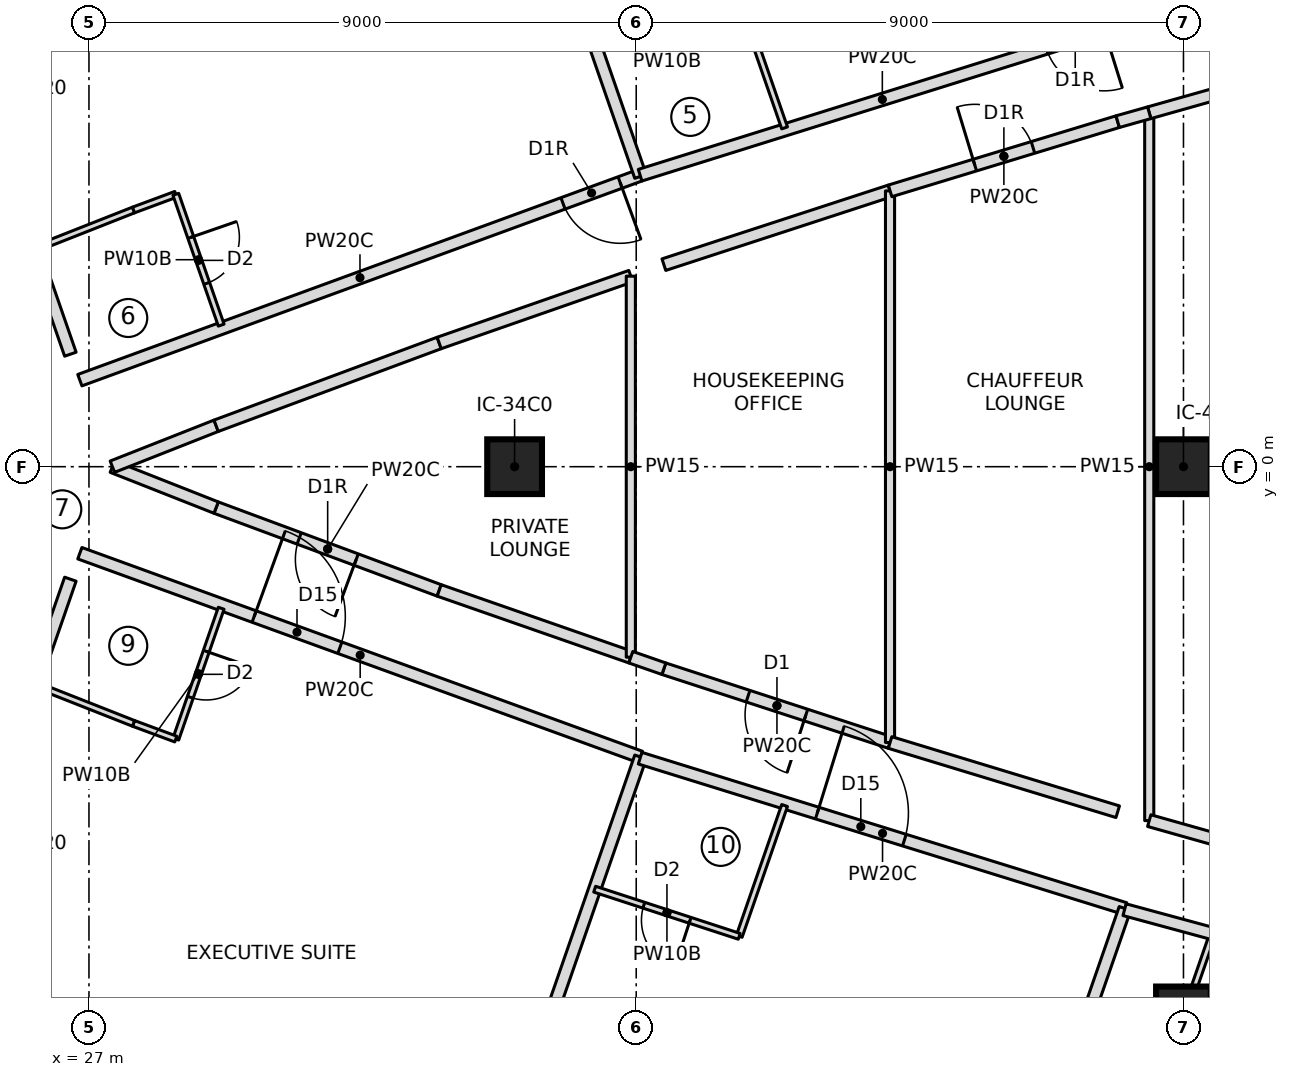
"""IFC4 building model, lengths in metres.
Left out: names, types, materials, properties, quantities, classifications, styles, units other than length and angle.
Written with IfcOpenShell. Run it as: python <this file> out.ifc"""

import sys

from ifc_helpers import new_model, si_unit, direction, frame, frame_2d, origin, origin_2d, place, context, subcontext, project, spatial, rectangle, extrude, element, fill, save


model = new_model("IFC4")
c1 = context("Model", 3, precision=1e-05, world=origin(), true_north=direction((0.0, 1.0)))
c2 = subcontext(c1, "Body", "Model", "MODEL_VIEW")
j1 = project(units=[si_unit("LENGTHUNIT", "METRE"), si_unit("PLANEANGLEUNIT", "RADIAN")], contexts=[c1])
p1 = place(None, origin())
s1 = spatial("IfcSite", under=j1, at=p1, CompositionType="ELEMENT")
p2 = place(p1, origin())
s2 = spatial("IfcBuilding", under=s1, at=p2, CompositionType="ELEMENT")
p3 = place(p2, frame((0.0, 0.0, 292.75)))
s3 = spatial("IfcBuildingStorey", under=s2, at=p3, CompositionType="ELEMENT", Elevation=292.75)
for number, where, z_axis, x_axis in (
    (1, (34.0, 0.0, 0.0), (0.0, 0.0, 1.0), (1.0, 0.0, 0.0)),
    (2, (45.0, -9.0, 0.0), (0.0, 0.0, 1.0), (1.0, 0.0, 0.0)),
    (3, (45.0, 0.0, 0.0), (0.0, 0.0, 1.0), (1.0, 0.0, 0.0)),
):
    element("IfcColumn", number, at=place(p3, frame(where, z_axis=z_axis, x_axis=x_axis)), inside=s3, PredefinedType="COLUMN", context=c2, shape_type="SweptSolid", body=[
        extrude(rectangle(XDim=0.9, YDim=0.9, at=origin_2d()), origin(), (0.0, 0.0, 1.0), 3.55),
    ])
p4 = place(p3, frame((26.694, 1.85, 0.0), z_axis=(0.0, 0.0, 1.0), x_axis=(-0.327714422317, 0.944776829418, 0.0)))
e4 = element("IfcWall", 4, at=p4, inside=s3, PredefinedType="PARTITIONING", context=c2, shape_type="SweptSolid", body=[
    extrude(rectangle(XDim=9.233, YDim=0.2, at=frame_2d((4.617, 0.0))), origin(), (0.0, 0.0, 1.0), 3.25),
])
p5 = place(p3, frame((36.064, 4.794, 0.0), z_axis=(0.0, 0.0, 1.0), x_axis=(-0.93911227702, -0.34361043516, 0.0)))
e5 = element("IfcWall", 5, at=p5, inside=s3, PredefinedType="PARTITIONING", context=c2, shape_type="SweptSolid", body=[
    extrude(rectangle(XDim=9.812, YDim=0.2, at=frame_2d((4.906, 0.0))), origin(), (0.0, 0.0, 1.0), 3.25),
])
p6 = place(p5, frame((0.35, 0.0, 0.0)))
e6 = element("IfcOpeningElement", 6, at=p6, cuts=e5, PredefinedType="OPENING", context=c2, shape_type="SweptSolid", body=[
    extrude(rectangle(XDim=1.0, YDim=2.1, at=frame_2d((0.5, 1.05))), frame((0.0, 0.11, 0.0), z_axis=(0.0, -1.0, 0.0), x_axis=(1.0, 0.0, 0.0)), (0.0, 0.0, 1.0), 0.22),
])
p7 = place(p3, frame((26.096, 3.576, 0.0), z_axis=(0.0, 0.0, 1.0), x_axis=(0.930254925629, 0.366913850028, 0.0)))
e7 = element("IfcWall", 7, at=p7, inside=s3, PredefinedType="PARTITIONING", context=c2, shape_type="SweptSolid", body=[
    extrude(rectangle(XDim=1.76, YDim=0.1, at=frame_2d((0.88, 0.0))), origin(), (0.0, 0.0, 1.0), 3.25),
])
p8 = place(p3, frame((27.733, 4.222, 0.0), z_axis=(0.0, 0.0, 1.0), x_axis=(0.937514267289, 0.347946833049, 0.0)))
e8 = element("IfcWall", 8, at=p8, inside=s3, PredefinedType="PARTITIONING", context=c2, shape_type="SweptSolid", body=[
    extrude(rectangle(XDim=0.742, YDim=0.1, at=frame_2d((0.371, 0.0))), origin(), (0.0, 0.0, 1.0), 3.25),
])
p9 = place(p3, frame((28.428, 4.48, 0.0), z_axis=(0.0, 0.0, 1.0), x_axis=(0.327718024288, -0.944775579996, 0.0)))
e9 = element("IfcWall", 9, at=p9, inside=s3, PredefinedType="PARTITIONING", context=c2, shape_type="SweptSolid", body=[
    extrude(rectangle(XDim=2.277, YDim=0.1, at=frame_2d((1.139, 0.0))), origin(), (0.0, 0.0, 1.0), 3.25),
])
p10 = place(p9, frame((0.75, 0.0, 0.0)))
e10 = element("IfcOpeningElement", 10, at=p10, cuts=e9, PredefinedType="OPENING", context=c2, shape_type="SweptSolid", body=[
    extrude(rectangle(XDim=0.8, YDim=2.1, at=frame_2d((0.4, 1.05))), frame((0.0, 0.06, 0.0), z_axis=(0.0, -1.0, 0.0), x_axis=(1.0, 0.0, 0.0)), (0.0, 0.0, 1.0), 0.12),
])
p11 = place(p3, frame((36.071, 4.775, 0.0), z_axis=(0.0, 0.0, 1.0), x_axis=(-0.327725028322, 0.94477315045, 0.0)))
e11 = element("IfcWall", 11, at=p11, inside=s3, PredefinedType="PARTITIONING", context=c2, shape_type="SweptSolid", body=[
    extrude(rectangle(XDim=9.702, YDim=0.2, at=frame_2d((4.851, 0.0))), origin(), (0.0, 0.0, 1.0), 3.25),
])
p12 = place(p3, frame((44.031, 7.286, 0.0), z_axis=(0.0, 0.0, 1.0), x_axis=(-0.95441177989, -0.29849313963, 0.0)))
e12 = element("IfcWall", 12, at=p12, inside=s3, PredefinedType="PARTITIONING", context=c2, shape_type="SweptSolid", body=[
    extrude(rectangle(XDim=8.348, YDim=0.2, at=frame_2d((4.174, 0.0))), origin(), (0.0, 0.0, 1.0), 3.25),
])
p13 = place(p12, frame((0.35, 0.0, 0.0)))
e13 = element("IfcOpeningElement", 13, at=p13, cuts=e12, PredefinedType="OPENING", context=c2, shape_type="SweptSolid", body=[
    extrude(rectangle(XDim=1.0, YDim=2.1, at=frame_2d((0.5, 1.05))), frame((0.0, 0.11, 0.0), z_axis=(0.0, -1.0, 0.0), x_axis=(1.0, 0.0, 0.0)), (0.0, 0.0, 1.0), 0.22),
])
p14 = place(p3, frame((37.694, 7.724, 0.0), z_axis=(0.0, 0.0, 1.0), x_axis=(0.327622330203, -0.944808768351, 0.0)))
e14 = element("IfcWall", 14, at=p14, inside=s3, PredefinedType="PARTITIONING", context=c2, shape_type="SweptSolid", body=[
    extrude(rectangle(XDim=2.277, YDim=0.1, at=frame_2d((1.139, 0.0))), origin(), (0.0, 0.0, 1.0), 3.25),
])
p15 = place(p3, frame((23.668, -10.573, 0.0), z_axis=(0.0, 0.0, 1.0), x_axis=(0.327714422317, 0.944776829418, 0.0)))
e15 = element("IfcWall", 15, at=p15, inside=s3, PredefinedType="PARTITIONING", context=c2, shape_type="SweptSolid", body=[
    extrude(rectangle(XDim=9.233, YDim=0.2, at=frame_2d((4.617, 0.0))), origin(), (0.0, 0.0, 1.0), 3.25),
])
p16 = place(p3, frame((26.85, -1.423, 0.0), z_axis=(0.0, 0.0, 1.0), x_axis=(0.939807953272, -0.341703103536, 0.0)))
e16 = element("IfcWall", 16, at=p16, inside=s3, PredefinedType="PARTITIONING", context=c2, shape_type="SweptSolid", body=[
    extrude(rectangle(XDim=9.811, YDim=0.2, at=frame_2d((4.906, 0.0))), origin(), (0.0, 0.0, 1.0), 3.25),
])
p17 = place(p16, frame((3.05, 0.0, 0.0)))
e17 = element("IfcOpeningElement", 17, at=p17, cuts=e16, PredefinedType="OPENING", context=c2, shape_type="SweptSolid", body=[
    extrude(rectangle(XDim=1.5, YDim=2.1, at=frame_2d((0.75, 1.05))), frame((0.0, 0.11, 0.0), z_axis=(0.0, -1.0, 0.0), x_axis=(1.0, 0.0, 0.0)), (0.0, 0.0, 1.0), 0.22),
])
p18 = place(p3, frame((29.175, -2.328, 0.0), z_axis=(0.0, 0.0, 1.0), x_axis=(-0.327718024288, -0.944775579996, 0.0)))
e18 = element("IfcWall", 18, at=p18, inside=s3, PredefinedType="PARTITIONING", context=c2, shape_type="SweptSolid", body=[
    extrude(rectangle(XDim=2.277, YDim=0.1, at=frame_2d((1.139, 0.0))), origin(), (0.0, 0.0, 1.0), 3.25),
])
p19 = place(p18, frame((0.75, 0.0, 0.0)))
e19 = element("IfcOpeningElement", 19, at=p19, cuts=e18, PredefinedType="OPENING", context=c2, shape_type="SweptSolid", body=[
    extrude(rectangle(XDim=0.8, YDim=2.1, at=frame_2d((0.4, 1.05))), frame((0.0, 0.06, 0.0), z_axis=(0.0, -1.0, 0.0), x_axis=(1.0, 0.0, 0.0)), (0.0, 0.0, 1.0), 0.12),
])
p20 = place(p3, frame((28.428, -4.48, 0.0), z_axis=(0.0, 0.0, 1.0), x_axis=(-0.937514267289, 0.347946833049, 0.0)))
e20 = element("IfcWall", 20, at=p20, inside=s3, PredefinedType="PARTITIONING", context=c2, shape_type="SweptSolid", body=[
    extrude(rectangle(XDim=0.742, YDim=0.1, at=frame_2d((0.371, 0.0))), origin(), (0.0, 0.0, 1.0), 3.25),
])
p21 = place(p3, frame((27.733, -4.222, 0.0), z_axis=(0.0, 0.0, 1.0), x_axis=(-0.930254925629, 0.366913850028, 0.0)))
e21 = element("IfcWall", 21, at=p21, inside=s3, PredefinedType="PARTITIONING", context=c2, shape_type="SweptSolid", body=[
    extrude(rectangle(XDim=1.76, YDim=0.1, at=frame_2d((0.88, 0.0))), origin(), (0.0, 0.0, 1.0), 3.25),
])
p22 = place(p3, frame((32.891, -13.941, 0.0), z_axis=(0.0, 0.0, 1.0), x_axis=(0.327725028322, 0.94477315045, 0.0)))
e22 = element("IfcWall", 22, at=p22, inside=s3, PredefinedType="PARTITIONING", context=c2, shape_type="SweptSolid", body=[
    extrude(rectangle(XDim=9.702, YDim=0.2, at=frame_2d((4.851, 0.0))), origin(), (0.0, 0.0, 1.0), 3.25),
])
p23 = place(p3, frame((36.064, -4.794, 0.0), z_axis=(0.0, 0.0, 1.0), x_axis=(0.955129200503, -0.296189483855, 0.0)))
e23 = element("IfcWall", 23, at=p23, inside=s3, PredefinedType="PARTITIONING", context=c2, shape_type="SweptSolid", body=[
    extrude(rectangle(XDim=8.348, YDim=0.2, at=frame_2d((4.174, 0.0))), origin(), (0.0, 0.0, 1.0), 3.25),
])
p24 = place(p23, frame((3.05, 0.0, 0.0)))
e24 = element("IfcOpeningElement", 24, at=p24, cuts=e23, PredefinedType="OPENING", context=c2, shape_type="SweptSolid", body=[
    extrude(rectangle(XDim=1.5, YDim=2.1, at=frame_2d((0.75, 1.05))), frame((0.0, 0.11, 0.0), z_axis=(0.0, -1.0, 0.0), x_axis=(1.0, 0.0, 0.0)), (0.0, 0.0, 1.0), 0.22),
])
p25 = place(p3, frame((38.44, -5.573, 0.0), z_axis=(0.0, 0.0, 1.0), x_axis=(-0.327622330203, -0.944808768351, 0.0)))
e25 = element("IfcWall", 25, at=p25, inside=s3, PredefinedType="PARTITIONING", context=c2, shape_type="SweptSolid", body=[
    extrude(rectangle(XDim=2.277, YDim=0.1, at=frame_2d((1.139, 0.0))), origin(), (0.0, 0.0, 1.0), 3.25),
])
p26 = place(p3, frame((37.694, -7.724, 0.0), z_axis=(0.0, 0.0, 1.0), x_axis=(-0.950666002187, 0.310216299194, 0.0)))
e26 = element("IfcWall", 26, at=p26, inside=s3, PredefinedType="PARTITIONING", context=c2, shape_type="SweptSolid", body=[
    extrude(rectangle(XDim=2.5, YDim=0.1, at=frame_2d((1.25, 0.0))), origin(), (0.0, 0.0, 1.0), 3.25),
])
p27 = place(p26, frame((0.85, 0.0, 0.0)))
e27 = element("IfcOpeningElement", 27, at=p27, cuts=e26, PredefinedType="OPENING", context=c2, shape_type="SweptSolid", body=[
    extrude(rectangle(XDim=0.8, YDim=2.1, at=frame_2d((0.4, 1.05))), frame((0.0, 0.06, 0.0), z_axis=(0.0, -1.0, 0.0), x_axis=(1.0, 0.0, 0.0)), (0.0, 0.0, 1.0), 0.12),
])
p28 = place(p3, frame((40.854, -16.447, 0.0), z_axis=(0.0, 0.0, 1.0), x_axis=(0.327714576096, 0.944776776077, 0.0)))
e28 = element("IfcWall", 28, at=p28, inside=s3, PredefinedType="PARTITIONING", context=c2, shape_type="SweptSolid", body=[
    extrude(rectangle(XDim=9.717, YDim=0.2, at=frame_2d((4.858, 0.0))), origin(), (0.0, 0.0, 1.0), 3.25),
])
p29 = place(p3, frame((45.45, -9.448, 0.0), z_axis=(0.0, 0.0, 1.0), x_axis=(0.0, 1.0, 0.0)))
e29 = element("IfcWall", 29, at=p29, inside=s3, PredefinedType="PARTITIONING", context=c2, shape_type="SweptSolid", body=[
    extrude(rectangle(XDim=0.896, YDim=0.1, at=frame_2d((0.448, 0.0))), origin(), (0.0, 0.0, 1.0), 3.25),
])
p30 = place(p3, frame((45.18, -8.55, 0.0), z_axis=(0.0, 0.0, 1.0), x_axis=(0.327723446833, 0.944773699039, 0.0)))
e30 = element("IfcWall", 30, at=p30, inside=s3, PredefinedType="PARTITIONING", context=c2, shape_type="SweptSolid", body=[
    extrude(rectangle(XDim=0.903, YDim=0.1, at=frame_2d((0.451, 0.0))), origin(), (0.0, 0.0, 1.0), 3.25),
])
p31 = place(p3, frame((32.76, -2.035, 0.0), z_axis=(0.0, 0.0, 1.0), x_axis=(-0.937460178932, 0.348092534992, 0.0)))
e31 = element("IfcWall", 31, at=p31, inside=s3, PredefinedType="PARTITIONING", context=c2, shape_type="SweptSolid", body=[
    extrude(rectangle(XDim=3.913, YDim=0.2, at=frame_2d((1.957, 0.0))), origin(), (0.0, 0.0, 1.0), 3.25),
])
p32 = place(p31, frame((1.457, 0.0, 0.0)))
e32 = element("IfcOpeningElement", 32, at=p32, cuts=e31, PredefinedType="OPENING", context=c2, shape_type="SweptSolid", body=[
    extrude(rectangle(XDim=1.0, YDim=2.1, at=frame_2d((0.5, 1.05))), frame((0.0, 0.11, 0.0), z_axis=(0.0, -1.0, 0.0), x_axis=(1.0, 0.0, 0.0)), (0.0, 0.0, 1.0), 0.22),
])
for number, where, z_axis, x_axis in (
    (33, (29.092, -0.673, 0.0), (0.0, 0.0, 1.0), (-0.93, 0.367, 0.0)),
    (34, (27.385, 0.0, 0.0), (0.0, 0.0, 1.0), (0.93, 0.367, 0.0)),
):
    element("IfcWall", number, at=place(p3, frame(where, z_axis=z_axis, x_axis=x_axis)), inside=s3, PredefinedType="PARTITIONING", context=c2, shape_type="SweptSolid", body=[
        extrude(rectangle(XDim=1.834, YDim=0.2, at=frame_2d((0.917, 0.0))), origin(), (0.0, 0.0, 1.0), 3.25),
    ])
p33 = place(p3, frame((29.092, 0.673, 0.0), z_axis=(0.0, 0.0, 1.0), x_axis=(0.937460178932, 0.348092534992, 0.0)))
e35 = element("IfcWall", 35, at=p33, inside=s3, PredefinedType="PARTITIONING", context=c2, shape_type="SweptSolid", body=[
    extrude(rectangle(XDim=3.913, YDim=0.2, at=frame_2d((1.957, 0.0))), origin(), (0.0, 0.0, 1.0), 3.25),
])
for number, where, z_axis, x_axis in (
    (36, (32.76, 2.035, 0.0), (0.0, 0.0, 1.0), (0.944, 0.329, 0.0)),
    (37, (35.911, -3.133, 0.0), (0.0, 0.0, 1.0), (-0.944, 0.329, 0.0)),
):
    element("IfcWall", number, at=place(p3, frame(where, z_axis=z_axis, x_axis=x_axis)), inside=s3, PredefinedType="PARTITIONING", context=c2, shape_type="SweptSolid", body=[
        extrude(rectangle(XDim=3.338, YDim=0.2, at=frame_2d((1.669, 0.0))), origin(), (0.0, 0.0, 1.0), 3.25),
    ])
p34 = place(p3, frame((35.911, -3.133, 0.0), z_axis=(0.0, 0.0, 1.0), x_axis=(0.0, 1.0, 0.0)))
e38 = element("IfcWall", 38, at=p34, inside=s3, PredefinedType="PARTITIONING", context=c2, shape_type="SweptSolid", body=[
    extrude(rectangle(XDim=6.267, YDim=0.15, at=frame_2d((3.133, 0.0))), origin(), (0.0, 0.0, 1.0), 3.25),
])
p35 = place(p3, frame((40.174, -4.536, 0.0), z_axis=(0.0, 0.0, 1.0), x_axis=(-0.950716244522, 0.310062287938, 0.0)))
e39 = element("IfcWall", 39, at=p35, inside=s3, PredefinedType="PARTITIONING", context=c2, shape_type="SweptSolid", body=[
    extrude(rectangle(XDim=3.913, YDim=0.2, at=frame_2d((1.956, 0.0))), origin(), (0.0, 0.0, 1.0), 3.25),
])
p36 = place(p35, frame((1.456, 0.0, 0.0)))
e40 = element("IfcOpeningElement", 40, at=p36, cuts=e39, PredefinedType="OPENING", context=c2, shape_type="SweptSolid", body=[
    extrude(rectangle(XDim=1.0, YDim=2.1, at=frame_2d((0.5, 1.05))), frame((0.0, 0.11, 0.0), z_axis=(0.0, -1.0, 0.0), x_axis=(1.0, 0.0, 0.0)), (0.0, 0.0, 1.0), 0.22),
])
p37 = place(p3, frame((36.455, 3.323, 0.0), z_axis=(0.0, 0.0, 1.0), x_axis=(0.950716244522, 0.310062287938, 0.0)))
e41 = element("IfcWall", 41, at=p37, inside=s3, PredefinedType="PARTITIONING", context=c2, shape_type="SweptSolid", body=[
    extrude(rectangle(XDim=3.913, YDim=0.2, at=frame_2d((1.956, 0.0))), origin(), (0.0, 0.0, 1.0), 3.25),
])
p38 = place(p3, frame((40.174, -4.536, 0.0), z_axis=(0.0, 0.0, 1.0), x_axis=(0.0, 1.0, 0.0)))
e42 = element("IfcWall", 42, at=p38, inside=s3, PredefinedType="PARTITIONING", context=c2, shape_type="SweptSolid", body=[
    extrude(rectangle(XDim=9.072, YDim=0.15, at=frame_2d((4.536, 0.0))), origin(), (0.0, 0.0, 1.0), 3.25),
])
p39 = place(p3, frame((40.175, 4.536, 0.0), z_axis=(0.0, 0.0, 1.0), x_axis=(0.956723737069, 0.29099775073, 0.0)))
e43 = element("IfcWall", 43, at=p39, inside=s3, PredefinedType="PARTITIONING", context=c2, shape_type="SweptSolid", body=[
    extrude(rectangle(XDim=3.913, YDim=0.2, at=frame_2d((1.957, 0.0))), origin(), (0.0, 0.0, 1.0), 3.25),
])
p40 = place(p39, frame((1.457, 0.0, 0.0)))
e44 = element("IfcOpeningElement", 44, at=p40, cuts=e43, PredefinedType="OPENING", context=c2, shape_type="SweptSolid", body=[
    extrude(rectangle(XDim=1.0, YDim=2.1, at=frame_2d((0.5, 1.05))), frame((0.0, 0.11, 0.0), z_axis=(0.0, -1.0, 0.0), x_axis=(1.0, 0.0, 0.0)), (0.0, 0.0, 1.0), 0.22),
])
p41 = place(p3, frame((43.918, -5.675, 0.0), z_axis=(0.0, 0.0, 1.0), x_axis=(-0.956723737069, 0.29099775073, 0.0)))
e45 = element("IfcWall", 45, at=p41, inside=s3, PredefinedType="PARTITIONING", context=c2, shape_type="SweptSolid", body=[
    extrude(rectangle(XDim=3.913, YDim=0.2, at=frame_2d((1.957, 0.0))), origin(), (0.0, 0.0, 1.0), 3.25),
])
p42 = place(p3, frame((44.437, -5.821, 0.0), z_axis=(0.0, 0.0, 1.0), x_axis=(0.0, 1.0, 0.0)))
e46 = element("IfcWall", 46, at=p42, inside=s3, PredefinedType="PARTITIONING", context=c2, shape_type="SweptSolid", body=[
    extrude(rectangle(XDim=11.642, YDim=0.15, at=frame_2d((5.821, 0.0))), origin(), (0.0, 0.0, 1.0), 3.25),
])
p43 = place(p3, frame((47.684, -6.738, 0.0), z_axis=(0.0, 0.0, 1.0), x_axis=(-0.962403613575, 0.271623424206, 0.0)))
e47 = element("IfcWall", 47, at=p43, inside=s3, PredefinedType="PARTITIONING", context=c2, shape_type="SweptSolid", body=[
    extrude(rectangle(XDim=3.374, YDim=0.2, at=frame_2d((1.687, 0.0))), origin(), (0.0, 0.0, 1.0), 3.25),
])
p44 = place(p43, frame((1.187, 0.0, 0.0)))
e48 = element("IfcOpeningElement", 48, at=p44, cuts=e47, PredefinedType="OPENING", context=c2, shape_type="SweptSolid", body=[
    extrude(rectangle(XDim=1.0, YDim=2.1, at=frame_2d((0.5, 1.05))), frame((0.0, 0.11, 0.0), z_axis=(0.0, -1.0, 0.0), x_axis=(1.0, 0.0, 0.0)), (0.0, 0.0, 1.0), 0.22),
])
p45 = place(p3, frame((44.437, 5.821, 0.0), z_axis=(0.0, 0.0, 1.0), x_axis=(0.962403613575, 0.271623424206, 0.0)))
e49 = element("IfcWall", 49, at=p45, inside=s3, PredefinedType="PARTITIONING", context=c2, shape_type="SweptSolid", body=[
    extrude(rectangle(XDim=3.374, YDim=0.2, at=frame_2d((1.687, 0.0))), origin(), (0.0, 0.0, 1.0), 3.25),
])
p46 = place(p3, frame((44.031, -7.286, 0.0), z_axis=(0.0, 0.0, 1.0), x_axis=(0.965107760304, -0.261853033211, 0.0)))
e50 = element("IfcWall", 50, at=p46, inside=s3, PredefinedType="PARTITIONING", context=c2, shape_type="SweptSolid", body=[
    extrude(rectangle(XDim=4.527, YDim=0.2, at=frame_2d((2.263, 0.0))), origin(), (0.0, 0.0, 1.0), 3.25),
])
p47 = place(p46, frame((1.851, 0.0, 0.0)))
e51 = element("IfcOpeningElement", 51, at=p47, cuts=e50, PredefinedType="OPENING", context=c2, shape_type="SweptSolid", body=[
    extrude(rectangle(XDim=1.5, YDim=2.1, at=frame_2d((0.75, 1.05))), frame((0.0, 0.11, 0.0), z_axis=(0.0, -1.0, 0.0), x_axis=(1.0, 0.0, 0.0)), (0.0, 0.0, 1.0), 0.22),
])
p48 = place(p3, frame((36.455, -3.323, 0.0), z_axis=(0.0, 0.0, 1.0), x_axis=(-0.9442216639, 0.329310566825, 0.0)))
e52 = element("IfcWall", 52, at=p48, inside=s3, PredefinedType="PARTITIONING", context=c2, shape_type="SweptSolid", body=[
    extrude(rectangle(XDim=0.575, YDim=0.2, at=frame_2d((0.288, 0.0))), origin(), (0.0, 0.0, 1.0), 3.25),
])
p49 = place(p3, frame((43.918, 5.675, 0.0), z_axis=(0.0, 0.0, 1.0), x_axis=(0.9624587823, 0.271427876929, 0.0)))
e53 = element("IfcWall", 53, at=p49, inside=s3, PredefinedType="PARTITIONING", context=c2, shape_type="SweptSolid", body=[
    extrude(rectangle(XDim=0.539, YDim=0.2, at=frame_2d((0.27, 0.0))), origin(), (0.0, 0.0, 1.0), 3.25),
])
p50 = place(p10, origin())
e54 = element("IfcDoor", 54, at=p50, inside=s3, OperationType="SINGLE_SWING_LEFT", PredefinedType="DOOR", context=c2, shape_type="SweptSolid", body=[
    extrude(rectangle(XDim=0.8, YDim=2.1, at=frame_2d((0.4, 1.05))), frame((0.0, 0.025, 0.0), z_axis=(0.0, -1.0, 0.0), x_axis=(1.0, 0.0, 0.0)), (0.0, 0.0, 1.0), 0.05),
])
fill(e10, e54)
p51 = place(p6, origin())
e55 = element("IfcDoor", 55, at=p51, inside=s3, OperationType="SINGLE_SWING_RIGHT", PredefinedType="DOOR", context=c2, shape_type="SweptSolid", body=[
    extrude(rectangle(XDim=1.0, YDim=2.1, at=frame_2d((0.5, 1.05))), frame((0.0, 0.025, 0.0), z_axis=(0.0, -1.0, 0.0), x_axis=(1.0, 0.0, 0.0)), (0.0, 0.0, 1.0), 0.05),
])
fill(e6, e55)
p52 = place(p19, origin())
e56 = element("IfcDoor", 56, at=p52, inside=s3, OperationType="SINGLE_SWING_LEFT", PredefinedType="DOOR", context=c2, shape_type="SweptSolid", body=[
    extrude(rectangle(XDim=0.8, YDim=2.1, at=frame_2d((0.4, 1.05))), frame((0.0, 0.025, 0.0), z_axis=(0.0, -1.0, 0.0), x_axis=(1.0, 0.0, 0.0)), (0.0, 0.0, 1.0), 0.05),
])
fill(e19, e56)
p53 = place(p17, origin())
e57 = element("IfcDoor", 57, at=p53, inside=s3, OperationType="DOUBLE_DOOR_SINGLE_SWING", PredefinedType="DOOR", context=c2, shape_type="SweptSolid", body=[
    extrude(rectangle(XDim=1.5, YDim=2.1, at=frame_2d((0.75, 1.05))), frame((0.0, 0.025, 0.0), z_axis=(0.0, -1.0, 0.0), x_axis=(1.0, 0.0, 0.0)), (0.0, 0.0, 1.0), 0.05),
])
fill(e17, e57)
p54 = place(p27, origin())
e58 = element("IfcDoor", 58, at=p54, inside=s3, OperationType="SINGLE_SWING_LEFT", PredefinedType="DOOR", context=c2, shape_type="SweptSolid", body=[
    extrude(rectangle(XDim=0.8, YDim=2.1, at=frame_2d((0.4, 1.05))), frame((0.0, 0.025, 0.0), z_axis=(0.0, -1.0, 0.0), x_axis=(1.0, 0.0, 0.0)), (0.0, 0.0, 1.0), 0.05),
])
fill(e27, e58)
p55 = place(p24, origin())
e59 = element("IfcDoor", 59, at=p55, inside=s3, OperationType="DOUBLE_DOOR_SINGLE_SWING", PredefinedType="DOOR", context=c2, shape_type="SweptSolid", body=[
    extrude(rectangle(XDim=1.5, YDim=2.1, at=frame_2d((0.75, 1.05))), frame((0.0, 0.025, 0.0), z_axis=(0.0, -1.0, 0.0), x_axis=(1.0, 0.0, 0.0)), (0.0, 0.0, 1.0), 0.05),
])
fill(e24, e59)
p56 = place(p32, origin())
e60 = element("IfcDoor", 60, at=p56, inside=s3, OperationType="SINGLE_SWING_RIGHT", PredefinedType="DOOR", context=c2, shape_type="SweptSolid", body=[
    extrude(rectangle(XDim=1.0, YDim=2.1, at=frame_2d((0.5, 1.05))), frame((0.0, 0.025, 0.0), z_axis=(0.0, -1.0, 0.0), x_axis=(1.0, 0.0, 0.0)), (0.0, 0.0, 1.0), 0.05),
])
fill(e32, e60)
p57 = place(p36, origin())
e61 = element("IfcDoor", 61, at=p57, inside=s3, OperationType="SINGLE_SWING_LEFT", PredefinedType="DOOR", context=c2, shape_type="SweptSolid", body=[
    extrude(rectangle(XDim=1.0, YDim=2.1, at=frame_2d((0.5, 1.05))), frame((0.0, 0.025, 0.0), z_axis=(0.0, -1.0, 0.0), x_axis=(1.0, 0.0, 0.0)), (0.0, 0.0, 1.0), 0.05),
])
fill(e40, e61)
p58 = place(p40, origin())
e62 = element("IfcDoor", 62, at=p58, inside=s3, OperationType="SINGLE_SWING_RIGHT", PredefinedType="DOOR", context=c2, shape_type="SweptSolid", body=[
    extrude(rectangle(XDim=1.0, YDim=2.1, at=frame_2d((0.5, 1.05))), frame((0.0, 0.025, 0.0), z_axis=(0.0, -1.0, 0.0), x_axis=(1.0, 0.0, 0.0)), (0.0, 0.0, 1.0), 0.05),
])
fill(e44, e62)
save(model, sys.argv[1])
